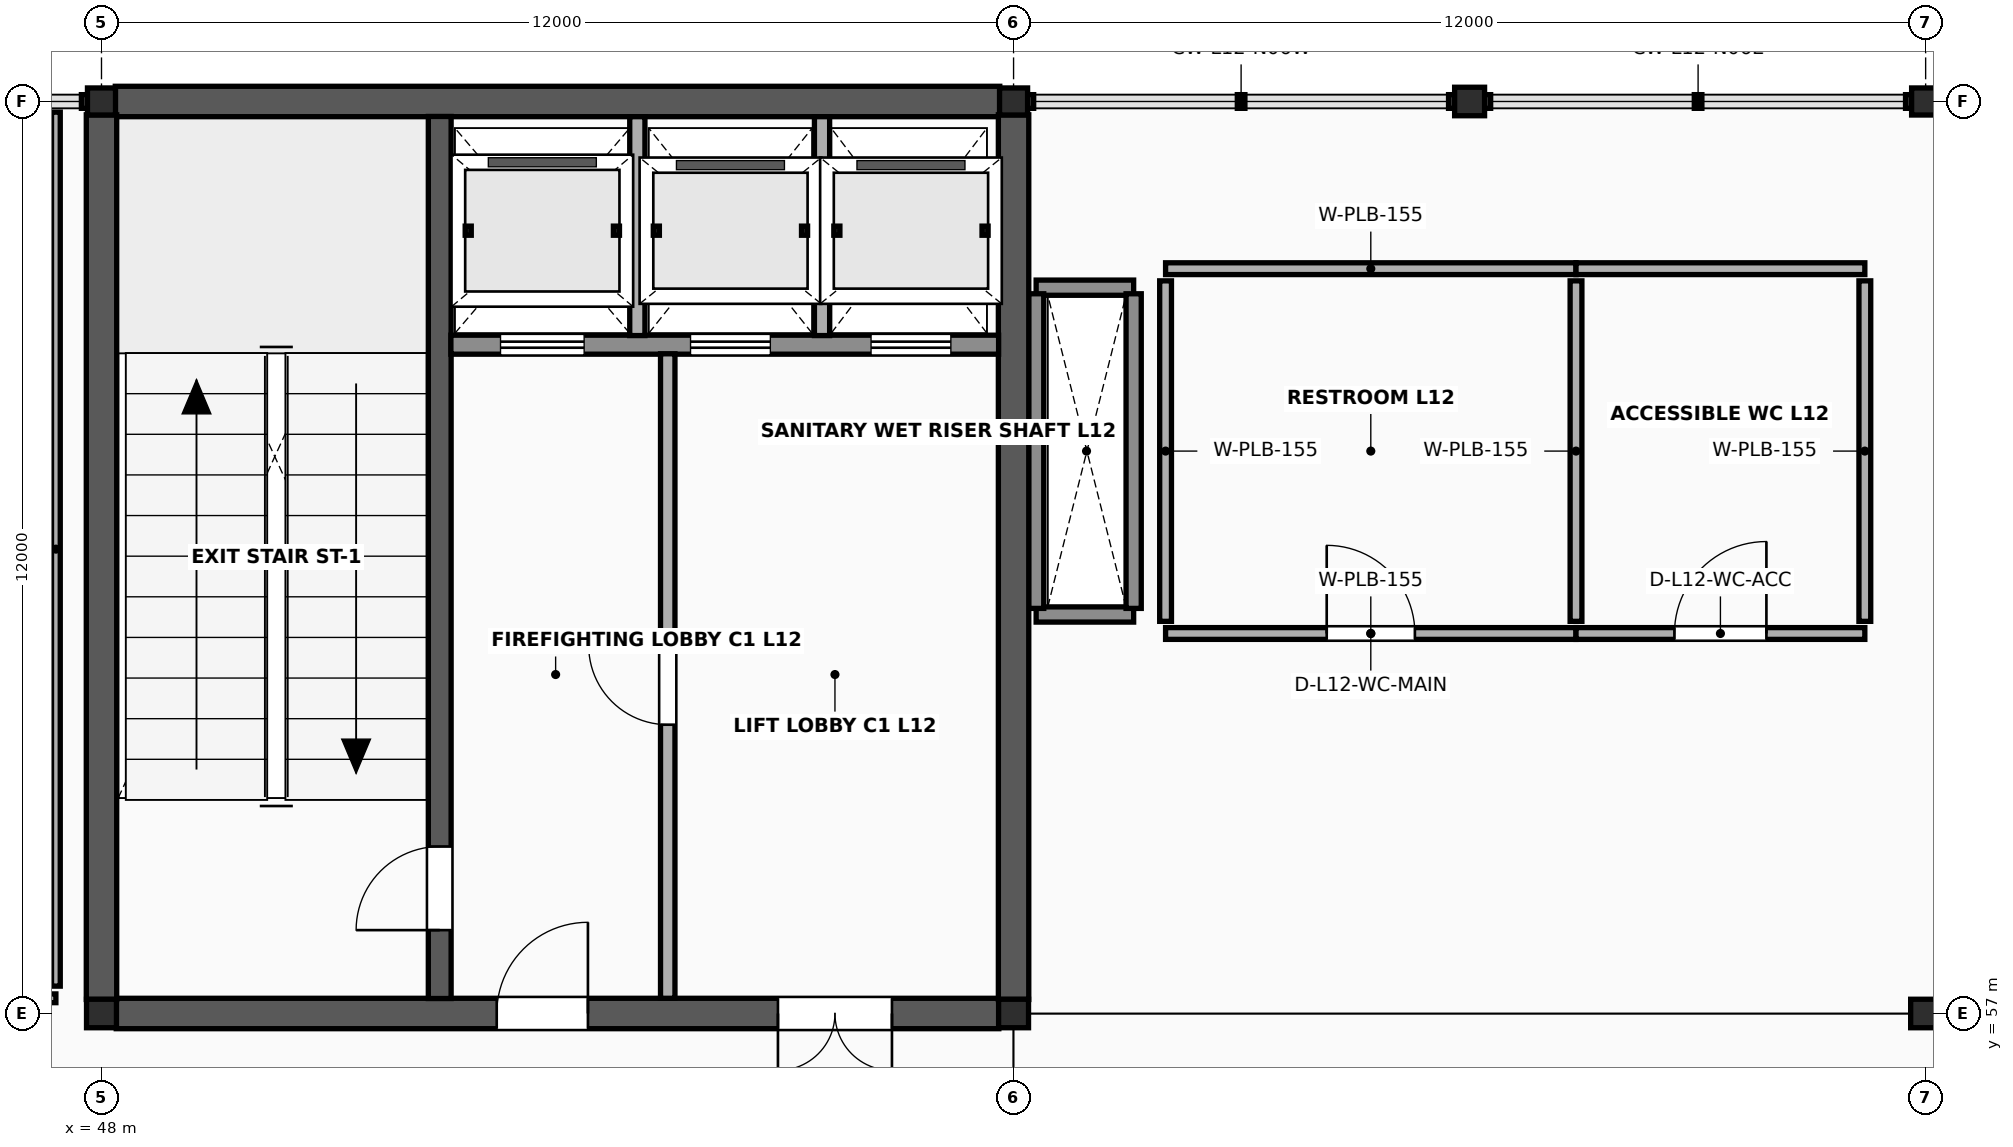
"""IFC4 building model, lengths in metres.
Left out: names, types, materials, properties, quantities, classifications, styles, units other than length and angle.
Written with IfcOpenShell. Run it as: python <this file> out.ifc"""

import sys

from ifc_helpers import new_model, si_unit, direction, frame, frame_2d, origin, origin_2d, place, context, subcontext, project, spatial, rectangle, i_section, extrude, element, fill, save


model = new_model("IFC4")
c1 = context("Model", 3, precision=1e-05, world=origin(), true_north=direction((0.0, 1.0)))
c2 = subcontext(c1, "Body", "Model", "MODEL_VIEW")
j1 = project(units=[si_unit("LENGTHUNIT", "METRE"), si_unit("PLANEANGLEUNIT", "RADIAN")], contexts=[c1])
p1 = place(None, origin())
s1 = spatial("IfcSite", under=j1, at=p1, CompositionType="ELEMENT")
p2 = place(p1, origin())
s2 = spatial("IfcBuilding", under=s1, at=p2, CompositionType="ELEMENT")
p3 = place(p2, frame((0.0, 0.0, 49.6)))
s3 = spatial("IfcBuildingStorey", under=s2, at=p3, CompositionType="ELEMENT", Elevation=49.6)
p4 = place(p3, frame((48.0, 57.0, 0.0), z_axis=(0.0, 0.0, 1.0), x_axis=(1.0, 0.0, 0.0)))
e1 = element("IfcColumn", 1, at=p4, inside=s3, PredefinedType="COLUMN", context=c2, shape_type="SweptSolid", body=[
    extrude(i_section(OverallWidth=0.394, OverallDepth=0.375, WebThickness=0.017, FlangeThickness=0.028, FilletRadius=0.018, at=origin_2d()), origin(), (0.0, 0.0, 1.0), 4.0),
])
p5 = place(p3, frame((48.0, 69.0, 0.0), z_axis=(0.0, 0.0, 1.0), x_axis=(1.0, 0.0, 0.0)))
e2 = element("IfcColumn", 2, at=p5, inside=s3, PredefinedType="COLUMN", context=c2, shape_type="SweptSolid", body=[
    extrude(i_section(OverallWidth=0.369, OverallDepth=0.356, WebThickness=0.011, FlangeThickness=0.018, FilletRadius=0.018, at=origin_2d()), origin(), (0.0, 0.0, 1.0), 4.0),
])
p6 = place(p3, frame((60.0, 57.0, 0.0), z_axis=(0.0, 0.0, 1.0), x_axis=(1.0, 0.0, 0.0)))
e3 = element("IfcColumn", 3, at=p6, inside=s3, PredefinedType="COLUMN", context=c2, shape_type="SweptSolid", body=[
    extrude(i_section(OverallWidth=0.394, OverallDepth=0.375, WebThickness=0.017, FlangeThickness=0.028, FilletRadius=0.018, at=origin_2d()), origin(), (0.0, 0.0, 1.0), 4.0),
])
p7 = place(p3, frame((60.0, 69.0, 0.0), z_axis=(0.0, 0.0, 1.0), x_axis=(1.0, 0.0, 0.0)))
e4 = element("IfcColumn", 4, at=p7, inside=s3, PredefinedType="COLUMN", context=c2, shape_type="SweptSolid", body=[
    extrude(i_section(OverallWidth=0.369, OverallDepth=0.356, WebThickness=0.011, FlangeThickness=0.018, FilletRadius=0.018, at=origin_2d()), origin(), (0.0, 0.0, 1.0), 4.0),
])
p8 = place(p3, frame((72.0, 57.0, 0.0), z_axis=(0.0, 0.0, 1.0), x_axis=(1.0, 0.0, 0.0)))
e5 = element("IfcColumn", 5, at=p8, inside=s3, PredefinedType="COLUMN", context=c2, shape_type="SweptSolid", body=[
    extrude(i_section(OverallWidth=0.394, OverallDepth=0.375, WebThickness=0.017, FlangeThickness=0.028, FilletRadius=0.018, at=origin_2d()), origin(), (0.0, 0.0, 1.0), 4.0),
])
p9 = place(p3, frame((72.0, 69.0, 0.0), z_axis=(0.0, 0.0, 1.0), x_axis=(1.0, 0.0, 0.0)))
e6 = element("IfcColumn", 6, at=p9, inside=s3, PredefinedType="COLUMN", context=c2, shape_type="SweptSolid", body=[
    extrude(i_section(OverallWidth=0.369, OverallDepth=0.356, WebThickness=0.011, FlangeThickness=0.018, FilletRadius=0.018, at=origin_2d()), origin(), (0.0, 0.0, 1.0), 4.0),
])
p10 = place(p3, frame((66.0, 69.0, 0.0), z_axis=(0.0, 0.0, 1.0), x_axis=(1.0, 0.0, 0.0)))
e7 = element("IfcColumn", 7, at=p10, inside=s3, PredefinedType="COLUMN", context=c2, shape_type="SweptSolid", body=[
    extrude(i_section(OverallWidth=0.394, OverallDepth=0.375, WebThickness=0.017, FlangeThickness=0.028, FilletRadius=0.018, at=origin_2d()), origin(), (0.0, 0.0, 1.0), 4.0),
])
for number, where, z_axis, x_axis in (
    (8, (60.297, 62.25, 0.0), (0.0, 0.0, 1.0), (1.0, 0.0, 0.0)),
    (9, (60.297, 66.55, 0.0), (0.0, 0.0, 1.0), (1.0, 0.0, 0.0)),
):
    element("IfcWall", number, at=place(p3, frame(where, z_axis=z_axis, x_axis=x_axis)), inside=s3, PredefinedType="SOLIDWALL", context=c2, shape_type="SweptSolid", body=[
        extrude(rectangle(XDim=1.283, YDim=0.2, at=frame_2d((0.642, 0.0))), origin(), (0.0, 0.0, 1.0), 3.848),
    ])
for number, where, z_axis, x_axis in (
    (10, (60.297, 62.33, 0.0), (0.0, 0.0, 1.0), (0.0, 1.0, 0.0)),
    (11, (61.58, 62.33, 0.0), (0.0, 0.0, 1.0), (0.0, 1.0, 0.0)),
):
    element("IfcWall", number, at=place(p3, frame(where, z_axis=z_axis, x_axis=x_axis)), inside=s3, PredefinedType="SOLIDWALL", context=c2, shape_type="SweptSolid", body=[
        extrude(rectangle(XDim=4.14, YDim=0.2, at=frame_2d((2.07, 0.0))), origin(), (0.0, 0.0, 1.0), 3.848),
    ])
p11 = place(p3, frame((48.194, 57.0, 0.0), z_axis=(0.0, 0.0, 1.0), x_axis=(1.0, 0.0, 0.0)))
e12 = element("IfcWall", 12, at=p11, inside=s3, PredefinedType="SHEAR", context=c2, shape_type="SweptSolid", body=[
    extrude(rectangle(XDim=11.612, YDim=0.4, at=frame_2d((5.806, 0.0))), origin(), (0.0, 0.0, 1.0), 3.848),
])
p12 = place(p11, frame((5.006, 0.0, 0.0)))
e13 = element("IfcOpeningElement", 13, at=p12, cuts=e12, PredefinedType="OPENING", context=c2, shape_type="SweptSolid", body=[
    extrude(rectangle(XDim=1.2, YDim=2.2, at=frame_2d((0.6, 1.1))), frame((0.0, 0.215, 0.0), z_axis=(0.0, -1.0, 0.0), x_axis=(1.0, 0.0, 0.0)), (0.0, 0.0, 1.0), 0.43),
])
p13 = place(p11, frame((8.706, 0.0, 0.0)))
e14 = element("IfcOpeningElement", 14, at=p13, cuts=e12, PredefinedType="OPENING", context=c2, shape_type="SweptSolid", body=[
    extrude(rectangle(XDim=1.5, YDim=2.25, at=frame_2d((0.75, 1.125))), frame((0.0, 0.215, 0.0), z_axis=(0.0, -1.0, 0.0), x_axis=(1.0, 0.0, 0.0)), (0.0, 0.0, 1.0), 0.43),
])
p14 = place(p3, frame((48.181, 69.0, 0.0), z_axis=(0.0, 0.0, 1.0), x_axis=(1.0, 0.0, 0.0)))
e15 = element("IfcWall", 15, at=p14, inside=s3, PredefinedType="SHEAR", context=c2, shape_type="SweptSolid", body=[
    extrude(rectangle(XDim=11.637, YDim=0.4, at=frame_2d((5.819, 0.0))), origin(), (0.0, 0.0, 1.0), 3.848),
])
for number, where, z_axis, x_axis in (
    (16, (48.0, 57.185, 0.0), (0.0, 0.0, 1.0), (0.0, 1.0, 0.0)),
    (17, (60.0, 57.185, 0.0), (0.0, 0.0, 1.0), (0.0, 1.0, 0.0)),
):
    element("IfcWall", number, at=place(p3, frame(where, z_axis=z_axis, x_axis=x_axis)), inside=s3, PredefinedType="SHEAR", context=c2, shape_type="SweptSolid", body=[
        extrude(rectangle(XDim=11.64, YDim=0.4, at=frame_2d((5.82, 0.0))), origin(), (0.0, 0.0, 1.0), 3.848),
    ])
p15 = place(p3, frame((52.45, 57.197, 0.0), z_axis=(0.0, 0.0, 1.0), x_axis=(0.0, 1.0, 0.0)))
e18 = element("IfcWall", 18, at=p15, inside=s3, PredefinedType="SHEAR", context=c2, shape_type="SweptSolid", body=[
    extrude(rectangle(XDim=11.606, YDim=0.3, at=frame_2d((5.803, 0.0))), origin(), (0.0, 0.0, 1.0), 3.848),
])
p16 = place(p15, frame((0.9, 0.0, 0.0)))
e19 = element("IfcOpeningElement", 19, at=p16, cuts=e18, PredefinedType="OPENING", context=c2, shape_type="SweptSolid", body=[
    extrude(rectangle(XDim=1.1, YDim=2.2, at=frame_2d((0.55, 1.1))), frame((0.0, 0.165, 0.0), z_axis=(0.0, -1.0, 0.0), x_axis=(1.0, 0.0, 0.0)), (0.0, 0.0, 1.0), 0.33),
])
p17 = place(p3, frame((52.597, 65.8, 0.0), z_axis=(0.0, 0.0, 1.0), x_axis=(1.0, 0.0, 0.0)))
e20 = element("IfcWall", 20, at=p17, inside=s3, PredefinedType="SOLIDWALL", context=c2, shape_type="SweptSolid", body=[
    extrude(rectangle(XDim=7.206, YDim=0.25, at=frame_2d((3.603, 0.0))), origin(), (0.0, 0.0, 1.0), 3.848),
])
p18 = place(p17, frame((0.653, 0.0, 0.0)))
e21 = element("IfcOpeningElement", 21, at=p18, cuts=e20, PredefinedType="OPENING", context=c2, shape_type="SweptSolid", body=[
    extrude(rectangle(XDim=1.1, YDim=2.24, at=frame_2d((0.55, 1.12))), frame((0.0, 0.14, 0.0), z_axis=(0.0, -1.0, 0.0), x_axis=(1.0, 0.0, 0.0)), (0.0, 0.0, 1.0), 0.28),
])
p19 = place(p17, frame((3.153, 0.0, 0.0)))
e22 = element("IfcOpeningElement", 22, at=p19, cuts=e20, PredefinedType="OPENING", context=c2, shape_type="SweptSolid", body=[
    extrude(rectangle(XDim=1.05, YDim=2.2, at=frame_2d((0.525, 1.1))), frame((0.0, 0.14, 0.0), z_axis=(0.0, -1.0, 0.0), x_axis=(1.0, 0.0, 0.0)), (0.0, 0.0, 1.0), 0.28),
])
p20 = place(p17, frame((5.528, 0.0, 0.0)))
e23 = element("IfcOpeningElement", 23, at=p20, cuts=e20, PredefinedType="OPENING", context=c2, shape_type="SweptSolid", body=[
    extrude(rectangle(XDim=1.05, YDim=2.2, at=frame_2d((0.525, 1.1))), frame((0.0, 0.14, 0.0), z_axis=(0.0, -1.0, 0.0), x_axis=(1.0, 0.0, 0.0)), (0.0, 0.0, 1.0), 0.28),
])
for number, where, z_axis, x_axis in (
    (24, (55.05, 65.92, 0.0), (0.0, 0.0, 1.0), (0.0, 1.0, 0.0)),
    (25, (57.48, 65.92, 0.0), (0.0, 0.0, 1.0), (0.0, 1.0, 0.0)),
):
    element("IfcWall", number, at=place(p3, frame(where, z_axis=z_axis, x_axis=x_axis)), inside=s3, PredefinedType="SOLIDWALL", context=c2, shape_type="SweptSolid", body=[
        extrude(rectangle(XDim=2.88, YDim=0.2, at=frame_2d((1.44, 0.0))), origin(), (0.0, 0.0, 1.0), 3.838),
    ])
p21 = place(p3, frame((55.45, 57.2, 0.0), z_axis=(0.0, 0.0, 1.0), x_axis=(0.0, 1.0, 0.0)))
e26 = element("IfcWall", 26, at=p21, inside=s3, PredefinedType="SOLIDWALL", context=c2, shape_type="SweptSolid", body=[
    extrude(rectangle(XDim=8.48, YDim=0.19, at=frame_2d((4.24, 0.0))), origin(), (0.0, 0.0, 1.0), 3.838),
])
p22 = place(p21, frame((3.6, 0.0, 0.0)))
e27 = element("IfcOpeningElement", 27, at=p22, cuts=e26, PredefinedType="OPENING", context=c2, shape_type="SweptSolid", body=[
    extrude(rectangle(XDim=1.04, YDim=2.18, at=frame_2d((0.52, 1.09))), frame((0.0, 0.11, 0.0), z_axis=(0.0, -1.0, 0.0), x_axis=(1.0, 0.0, 0.0)), (0.0, 0.0, 1.0), 0.22),
])
p23 = place(p3, frame((62.0, 62.0, 0.0), z_axis=(0.0, 0.0, 1.0), x_axis=(1.0, 0.0, 0.0)))
e28 = element("IfcWall", 28, at=p23, inside=s3, PredefinedType="PLUMBINGWALL", context=c2, shape_type="SweptSolid", body=[
    extrude(rectangle(XDim=5.4, YDim=0.155, at=frame_2d((2.7, 0.0))), origin(), (0.0, 0.0, 1.0), 2.88),
])
p24 = place(p23, frame((2.12, 0.0, 0.0)))
e29 = element("IfcOpeningElement", 29, at=p24, cuts=e28, PredefinedType="OPENING", context=c2, shape_type="SweptSolid", body=[
    extrude(rectangle(XDim=1.16, YDim=2.23, at=frame_2d((0.58, 1.115))), frame((0.0, 0.093, 0.0), z_axis=(0.0, -1.0, 0.0), x_axis=(1.0, 0.0, 0.0)), (0.0, 0.0, 1.0), 0.185),
])
p25 = place(p3, frame((62.0, 66.8, 0.0), z_axis=(0.0, 0.0, 1.0), x_axis=(1.0, 0.0, 0.0)))
e30 = element("IfcWall", 30, at=p25, inside=s3, PredefinedType="PLUMBINGWALL", context=c2, shape_type="SweptSolid", body=[
    extrude(rectangle(XDim=5.4, YDim=0.155, at=frame_2d((2.7, 0.0))), origin(), (0.0, 0.0, 1.0), 2.88),
])
for number, where, z_axis, x_axis in (
    (31, (62.0, 62.16, 0.0), (0.0, 0.0, 1.0), (0.0, 1.0, 0.0)),
    (32, (67.4, 62.16, 0.0), (0.0, 0.0, 1.0), (0.0, 1.0, 0.0)),
):
    element("IfcWall", number, at=place(p3, frame(where, z_axis=z_axis, x_axis=x_axis)), inside=s3, PredefinedType="PLUMBINGWALL", context=c2, shape_type="SweptSolid", body=[
        extrude(rectangle(XDim=4.48, YDim=0.155, at=frame_2d((2.24, 0.0))), origin(), (0.0, 0.0, 1.0), 2.88),
    ])
p26 = place(p3, frame((67.4, 62.0, 0.0), z_axis=(0.0, 0.0, 1.0), x_axis=(1.0, 0.0, 0.0)))
e33 = element("IfcWall", 33, at=p26, inside=s3, PredefinedType="PLUMBINGWALL", context=c2, shape_type="SweptSolid", body=[
    extrude(rectangle(XDim=3.8, YDim=0.155, at=frame_2d((1.9, 0.0))), origin(), (0.0, 0.0, 1.0), 2.88),
])
p27 = place(p26, frame((1.295, 0.0, 0.0)))
e34 = element("IfcOpeningElement", 34, at=p27, cuts=e33, PredefinedType="OPENING", context=c2, shape_type="SweptSolid", body=[
    extrude(rectangle(XDim=1.21, YDim=2.25, at=frame_2d((0.605, 1.125))), frame((0.0, 0.093, 0.0), z_axis=(0.0, -1.0, 0.0), x_axis=(1.0, 0.0, 0.0)), (0.0, 0.0, 1.0), 0.185),
])
p28 = place(p3, frame((67.4, 66.8, 0.0), z_axis=(0.0, 0.0, 1.0), x_axis=(1.0, 0.0, 0.0)))
e35 = element("IfcWall", 35, at=p28, inside=s3, PredefinedType="PLUMBINGWALL", context=c2, shape_type="SweptSolid", body=[
    extrude(rectangle(XDim=3.8, YDim=0.155, at=frame_2d((1.9, 0.0))), origin(), (0.0, 0.0, 1.0), 2.88),
])
p29 = place(p3, frame((71.2, 62.16, 0.0), z_axis=(0.0, 0.0, 1.0), x_axis=(0.0, 1.0, 0.0)))
e36 = element("IfcWall", 36, at=p29, inside=s3, PredefinedType="PLUMBINGWALL", context=c2, shape_type="SweptSolid", body=[
    extrude(rectangle(XDim=4.48, YDim=0.155, at=frame_2d((2.24, 0.0))), origin(), (0.0, 0.0, 1.0), 2.88),
])
p30 = place(p3, frame((36.14, 57.2, 0.0), z_axis=(0.0, 0.0, 1.0), x_axis=(1.0, 0.0, 0.0)))
e37 = element("IfcWall", 37, at=p30, inside=s3, PredefinedType="PARTITIONING", context=c2, shape_type="SweptSolid", body=[
    extrude(rectangle(XDim=11.26, YDim=0.115, at=frame_2d((5.63, 0.0))), origin(), (0.0, 0.0, 1.0), 2.88),
])
p31 = place(p30, frame((5.115, 0.0, 0.0)))
e38 = element("IfcOpeningElement", 38, at=p31, cuts=e37, PredefinedType="OPENING", context=c2, shape_type="SweptSolid", body=[
    extrude(rectangle(XDim=1.03, YDim=2.17, at=frame_2d((0.515, 1.085))), frame((0.0, 0.073, 0.0), z_axis=(0.0, -1.0, 0.0), x_axis=(1.0, 0.0, 0.0)), (0.0, 0.0, 1.0), 0.145),
])
p32 = place(p3, frame((47.4, 57.36, 0.0), z_axis=(0.0, 0.0, 1.0), x_axis=(0.0, 1.0, 0.0)))
e39 = element("IfcWall", 39, at=p32, inside=s3, PredefinedType="PARTITIONING", context=c2, shape_type="SweptSolid", body=[
    extrude(rectangle(XDim=11.5, YDim=0.115, at=frame_2d((5.75, 0.0))), origin(), (0.0, 0.0, 1.0), 2.88),
])
p33 = place(p16, origin())
e40 = element("IfcDoor", 40, at=p33, inside=s3, OperationType="SINGLE_SWING_LEFT", PredefinedType="DOOR", context=c2, shape_type="SweptSolid", body=[
    extrude(rectangle(XDim=1.1, YDim=2.2, at=frame_2d((0.55, 1.1))), frame((0.0, 0.025, 0.0), z_axis=(0.0, -1.0, 0.0), x_axis=(1.0, 0.0, 0.0)), (0.0, 0.0, 1.0), 0.05),
])
fill(e19, e40)
p34 = place(p22, origin())
e41 = element("IfcDoor", 41, at=p34, inside=s3, OperationType="SINGLE_SWING_RIGHT", PredefinedType="DOOR", context=c2, shape_type="SweptSolid", body=[
    extrude(rectangle(XDim=1.04, YDim=2.18, at=frame_2d((0.52, 1.09))), frame((0.0, 0.025, 0.0), z_axis=(0.0, -1.0, 0.0), x_axis=(1.0, 0.0, 0.0)), (0.0, 0.0, 1.0), 0.05),
])
fill(e27, e41)
p35 = place(p12, origin())
e42 = element("IfcDoor", 42, at=p35, inside=s3, OperationType="SINGLE_SWING_RIGHT", PredefinedType="DOOR", context=c2, shape_type="SweptSolid", body=[
    extrude(rectangle(XDim=1.2, YDim=2.2, at=frame_2d((0.6, 1.1))), frame((0.0, 0.025, 0.0), z_axis=(0.0, -1.0, 0.0), x_axis=(1.0, 0.0, 0.0)), (0.0, 0.0, 1.0), 0.05),
])
fill(e13, e42)
p36 = place(p13, origin())
e43 = element("IfcDoor", 43, at=p36, inside=s3, OperationType="DOUBLE_DOOR_SINGLE_SWING", PredefinedType="DOOR", context=c2, shape_type="SweptSolid", body=[
    extrude(rectangle(XDim=1.5, YDim=2.25, at=frame_2d((0.75, 1.125))), frame((0.0, 0.025, 0.0), z_axis=(0.0, -1.0, 0.0), x_axis=(1.0, 0.0, 0.0)), (0.0, 0.0, 1.0), 0.05),
])
fill(e14, e43)
p37 = place(p18, origin())
e44 = element("IfcDoor", 44, at=p37, inside=s3, OperationType="SLIDING_TO_LEFT", PredefinedType="USERDEFINED", context=c2, shape_type="SweptSolid", body=[
    extrude(rectangle(XDim=1.1, YDim=2.24, at=frame_2d((0.55, 1.12))), frame((0.0, 0.025, 0.0), z_axis=(0.0, -1.0, 0.0), x_axis=(1.0, 0.0, 0.0)), (0.0, 0.0, 1.0), 0.05),
])
fill(e21, e44)
p38 = place(p19, origin())
e45 = element("IfcDoor", 45, at=p38, inside=s3, OperationType="SLIDING_TO_LEFT", PredefinedType="USERDEFINED", context=c2, shape_type="SweptSolid", body=[
    extrude(rectangle(XDim=1.05, YDim=2.2, at=frame_2d((0.525, 1.1))), frame((0.0, 0.025, 0.0), z_axis=(0.0, -1.0, 0.0), x_axis=(1.0, 0.0, 0.0)), (0.0, 0.0, 1.0), 0.05),
])
fill(e22, e45)
p39 = place(p20, origin())
e46 = element("IfcDoor", 46, at=p39, inside=s3, OperationType="SLIDING_TO_LEFT", PredefinedType="USERDEFINED", context=c2, shape_type="SweptSolid", body=[
    extrude(rectangle(XDim=1.05, YDim=2.2, at=frame_2d((0.525, 1.1))), frame((0.0, 0.025, 0.0), z_axis=(0.0, -1.0, 0.0), x_axis=(1.0, 0.0, 0.0)), (0.0, 0.0, 1.0), 0.05),
])
fill(e23, e46)
p40 = place(p24, origin())
e47 = element("IfcDoor", 47, at=p40, inside=s3, OperationType="SINGLE_SWING_LEFT", PredefinedType="DOOR", context=c2, shape_type="SweptSolid", body=[
    extrude(rectangle(XDim=1.16, YDim=2.23, at=frame_2d((0.58, 1.115))), frame((0.0, 0.025, 0.0), z_axis=(0.0, -1.0, 0.0), x_axis=(1.0, 0.0, 0.0)), (0.0, 0.0, 1.0), 0.05),
])
fill(e29, e47)
p41 = place(p27, origin())
e48 = element("IfcDoor", 48, at=p41, inside=s3, OperationType="SINGLE_SWING_RIGHT", PredefinedType="DOOR", context=c2, shape_type="SweptSolid", body=[
    extrude(rectangle(XDim=1.21, YDim=2.25, at=frame_2d((0.605, 1.125))), frame((0.0, 0.025, 0.0), z_axis=(0.0, -1.0, 0.0), x_axis=(1.0, 0.0, 0.0)), (0.0, 0.0, 1.0), 0.05),
])
fill(e34, e48)
save(model, sys.argv[1])
